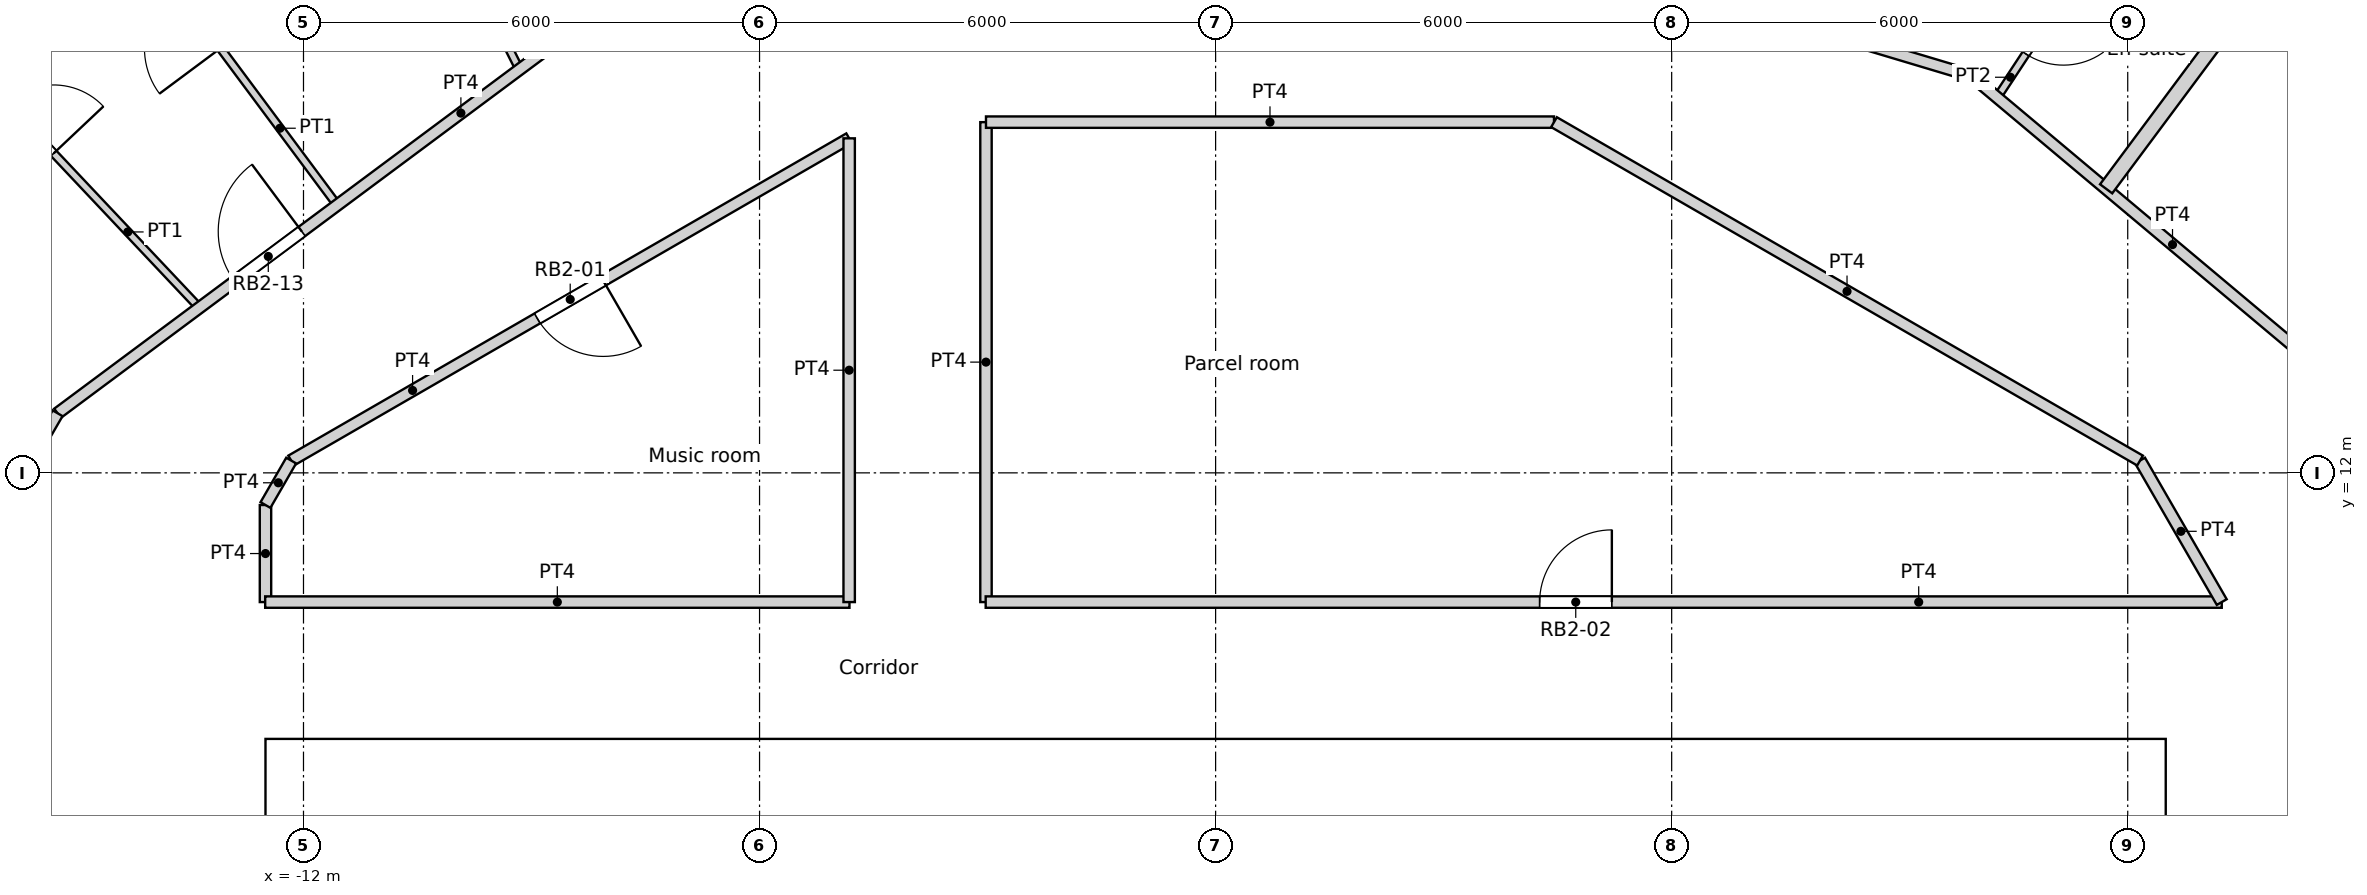
"""IFC4 building model, lengths in metres.
Left out: names, types, materials, properties, quantities, classifications, styles, units other than length and angle.
Written with IfcOpenShell. Run it as: python <this file> out.ifc"""

import sys

from ifc_helpers import new_model, si_unit, direction, frame, frame_2d, origin, origin_2d, place, context, subcontext, project, spatial, rectangle, circle, extrude, element, fill, save


model = new_model("IFC4")
c1 = context("Model", 3, precision=1e-05, world=origin(), true_north=direction((0.0, 1.0)))
c2 = subcontext(c1, "Body", "Model", "MODEL_VIEW")
j1 = project(units=[si_unit("LENGTHUNIT", "METRE"), si_unit("PLANEANGLEUNIT", "RADIAN")], contexts=[c1])
p1 = place(None, origin())
s1 = spatial("IfcSite", under=j1, at=p1, CompositionType="ELEMENT")
p2 = place(p1, origin())
s2 = spatial("IfcBuilding", under=s1, at=p2, CompositionType="ELEMENT")
p3 = place(p2, frame((0.0, 0.0, 136.8)))
s3 = spatial("IfcBuildingStorey", under=s2, at=p3, CompositionType="ELEMENT", Elevation=136.8)
for number, where, z_axis, x_axis in (
    (1, (11.735, 14.716, 0.0), (0.0, 0.0, 1.0), (1.0, 0.0, 0.0)),
    (2, (6.876, 17.521, 0.0), (0.0, 0.0, 1.0), (1.0, 0.0, 0.0)),
    (3, (-9.411, 16.301, 0.0), (0.0, 0.0, 1.0), (1.0, 0.0, 0.0)),
    (4, (-13.798, 12.802, 0.0), (0.0, 0.0, 1.0), (1.0, 0.0, 0.0)),
):
    element("IfcColumn", number, at=place(p3, frame(where, z_axis=z_axis, x_axis=x_axis)), inside=s3, PredefinedType="COLUMN", context=c2, shape_type="SweptSolid", body=[
        extrude(circle(Radius=0.65, at=origin_2d()), origin(), (0.0, 0.0, 1.0), 3.6),
    ])
p4 = place(p3, frame((-12.5, 8.05, 0.0), z_axis=(0.0, 0.0, 1.0), x_axis=(1.0, 0.0, 0.0)))
e5 = element("IfcWall", 5, at=p4, inside=s3, PredefinedType="SOLIDWALL", context=c2, shape_type="SweptSolid", body=[
    extrude(rectangle(XDim=25.0, YDim=0.9, at=frame_2d((12.5, 0.0))), origin(), (0.0, 0.0, 1.0), 3.6),
])
p5 = place(p4, frame((8.3, 0.0, 0.0)))
e6 = element("IfcOpeningElement", 6, at=p5, cuts=e5, PredefinedType="OPENING", context=c2, shape_type="SweptSolid", body=[
    extrude(rectangle(XDim=1.8, YDim=2.1, at=frame_2d((0.9, 1.05))), frame((0.0, 0.45, 0.0), z_axis=(0.0, -1.0, 0.0), x_axis=(1.0, 0.0, 0.0)), (0.0, 0.0, 1.0), 0.9),
])
p6 = place(p3, frame((-12.05, -7.6, 0.0), z_axis=(0.0, 0.0, 1.0), x_axis=(0.0, 1.0, 0.0)))
e7 = element("IfcWall", 7, at=p6, inside=s3, PredefinedType="SOLIDWALL", context=c2, shape_type="SweptSolid", body=[
    extrude(rectangle(XDim=15.2, YDim=0.9, at=frame_2d((7.6, 0.0))), origin(), (0.0, 0.0, 1.0), 3.6),
])
p7 = place(p6, frame((7.1, 0.0, 0.0)))
e8 = element("IfcOpeningElement", 8, at=p7, cuts=e7, PredefinedType="OPENING", context=c2, shape_type="SweptSolid", body=[
    extrude(rectangle(XDim=1.0, YDim=2.1, at=frame_2d((0.5, 1.05))), frame((0.0, 0.45, 0.0), z_axis=(0.0, -1.0, 0.0), x_axis=(1.0, 0.0, 0.0)), (0.0, 0.0, 1.0), 0.9),
])
p8 = place(p3, frame((12.05, -7.6, 0.0), z_axis=(0.0, 0.0, 1.0), x_axis=(0.0, 1.0, 0.0)))
e9 = element("IfcWall", 9, at=p8, inside=s3, PredefinedType="SOLIDWALL", context=c2, shape_type="SweptSolid", body=[
    extrude(rectangle(XDim=15.2, YDim=0.9, at=frame_2d((7.6, 0.0))), origin(), (0.0, 0.0, 1.0), 3.6),
])
p9 = place(p8, frame((5.1, 0.0, 0.0)))
e10 = element("IfcOpeningElement", 10, at=p9, cuts=e9, PredefinedType="OPENING", context=c2, shape_type="SweptSolid", body=[
    extrude(rectangle(XDim=1.0, YDim=2.1, at=frame_2d((0.5, 1.05))), frame((0.0, 0.45, 0.0), z_axis=(0.0, -1.0, 0.0), x_axis=(1.0, 0.0, 0.0)), (0.0, 0.0, 1.0), 0.9),
])
for number, where, z_axis, x_axis in (
    (11, (-2.25, 3.25, 0.0), (0.0, 0.0, 1.0), (0.0, 1.0, 0.0)),
    (12, (0.55, 3.25, 0.0), (0.0, 0.0, 1.0), (0.0, 1.0, 0.0)),
):
    element("IfcWall", number, at=place(p3, frame(where, z_axis=z_axis, x_axis=x_axis)), inside=s3, PredefinedType="SOLIDWALL", context=c2, shape_type="SweptSolid", body=[
        extrude(rectangle(XDim=4.35, YDim=0.3, at=frame_2d((2.175, 0.0))), origin(), (0.0, 0.0, 1.0), 3.3),
    ])
p10 = place(p3, frame((-9.05, -7.0, 0.0), z_axis=(0.0, 0.0, 1.0), x_axis=(0.0, 1.0, 0.0)))
e13 = element("IfcWall", 13, at=p10, inside=s3, PredefinedType="SOLIDWALL", context=c2, shape_type="SweptSolid", body=[
    extrude(rectangle(XDim=14.6, YDim=0.3, at=frame_2d((7.3, 0.0))), origin(), (0.0, 0.0, 1.0), 3.3),
])
p11 = place(p3, frame((-4.275, 6.7, 0.0), z_axis=(0.0, 0.0, 1.0), x_axis=(0.0, 1.0, 0.0)))
e14 = element("IfcWall", 14, at=p11, inside=s3, PredefinedType="SOLIDWALL", context=c2, shape_type="SweptSolid", body=[
    extrude(rectangle(XDim=0.9, YDim=0.15, at=frame_2d((0.45, 0.0))), origin(), (0.0, 0.0, 1.0), 3.3),
])
p12 = place(p3, frame((0.7, 7.15, 0.0), z_axis=(0.0, 0.0, 1.0), x_axis=(1.0, 0.0, 0.0)))
e15 = element("IfcWall", 15, at=p12, inside=s3, PredefinedType="SOLIDWALL", context=c2, shape_type="SweptSolid", body=[
    extrude(rectangle(XDim=8.35, YDim=0.9, at=frame_2d((4.175, 0.0))), origin(), (0.0, 0.0, 1.0), 3.3),
])
p13 = place(p3, frame((-12.504, 10.3, 0.0), z_axis=(0.0, 0.0, 1.0), x_axis=(1.0, 0.0, 0.0)))
e16 = element("IfcWall", 16, at=p13, inside=s3, PredefinedType="PARTITIONING", context=c2, shape_type="SweptSolid", body=[
    extrude(rectangle(XDim=7.687, YDim=0.15, at=frame_2d((3.844, 0.0))), origin(), (0.0, 0.0, 1.0), 3.3),
])
p14 = place(p3, frame((-3.025, 10.3, 0.0), z_axis=(0.0, 0.0, 1.0), x_axis=(1.0, 0.0, 0.0)))
e17 = element("IfcWall", 17, at=p14, inside=s3, PredefinedType="PARTITIONING", context=c2, shape_type="SweptSolid", body=[
    extrude(rectangle(XDim=16.262, YDim=0.15, at=frame_2d((8.131, 0.0))), origin(), (0.0, 0.0, 1.0), 3.3),
])
p15 = place(p14, frame((7.288, 0.0, 0.0)))
e18 = element("IfcOpeningElement", 18, at=p15, cuts=e17, PredefinedType="OPENING", context=c2, shape_type="SweptSolid", body=[
    extrude(rectangle(XDim=0.95, YDim=2.1, at=frame_2d((0.475, 1.05))), frame((0.0, 0.075, 0.0), z_axis=(0.0, -1.0, 0.0), x_axis=(1.0, 0.0, 0.0)), (0.0, 0.0, 1.0), 0.15),
])
p16 = place(p3, frame((12.162, 12.162, 0.0), z_axis=(0.0, 0.0, 1.0), x_axis=(0.499961633463, -0.866047553582, 0.0)))
e19 = element("IfcWall", 19, at=p16, inside=s3, PredefinedType="PARTITIONING", context=c2, shape_type="SweptSolid", body=[
    extrude(rectangle(XDim=2.15, YDim=0.15, at=frame_2d((1.075, 0.0))), origin(), (0.0, 0.0, 1.0), 3.3),
])
p17 = place(p3, frame((9.943, 17.222, 0.0), z_axis=(0.0, 0.0, 1.0), x_axis=(0.766192104565, -0.642611592567, 0.0)))
e20 = element("IfcWall", 20, at=p17, inside=s3, PredefinedType="PARTITIONING", context=c2, shape_type="SweptSolid", body=[
    extrude(rectangle(XDim=6.906, YDim=0.15, at=frame_2d((3.453, 0.0))), origin(), (0.0, 0.0, 1.0), 3.3),
])
p18 = place(p3, frame((-4.821, 10.3, 0.0), z_axis=(0.0, 0.0, 1.0), x_axis=(0.0, 1.0, 0.0)))
e21 = element("IfcWall", 21, at=p18, inside=s3, PredefinedType="PARTITIONING", context=c2, shape_type="SweptSolid", body=[
    extrude(rectangle(XDim=6.101, YDim=0.15, at=frame_2d((3.05, 0.0))), origin(), (0.0, 0.0, 1.0), 3.3),
])
p19 = place(p3, frame((-12.162, 12.162, 0.0), z_axis=(0.0, 0.0, 1.0), x_axis=(0.866004766557, 0.500035743023, 0.0)))
e22 = element("IfcWall", 22, at=p19, inside=s3, PredefinedType="PARTITIONING", context=c2, shape_type="SweptSolid", body=[
    extrude(rectangle(XDim=8.477, YDim=0.15, at=frame_2d((4.239, 0.0))), origin(), (0.0, 0.0, 1.0), 3.3),
])
p20 = place(p19, frame((3.739, 0.0, 0.0)))
e23 = element("IfcOpeningElement", 23, at=p20, cuts=e22, PredefinedType="OPENING", context=c2, shape_type="SweptSolid", body=[
    extrude(rectangle(XDim=1.0, YDim=2.04, at=frame_2d((0.5, 1.02))), frame((0.0, 0.075, 0.0), z_axis=(0.0, -1.0, 0.0), x_axis=(1.0, 0.0, 0.0)), (0.0, 0.0, 1.0), 0.15),
])
p21 = place(p3, frame((4.452, 16.614, 0.0), z_axis=(0.0, 0.0, 1.0), x_axis=(0.866005203721, -0.500034985904, 0.0)))
e24 = element("IfcWall", 24, at=p21, inside=s3, PredefinedType="PARTITIONING", context=c2, shape_type="SweptSolid", body=[
    extrude(rectangle(XDim=8.903, YDim=0.15, at=frame_2d((4.452, 0.0))), origin(), (0.0, 0.0, 1.0), 3.3),
])
p22 = place(p3, frame((-3.021, 16.614, 0.0), z_axis=(0.0, 0.0, 1.0), x_axis=(1.0, 0.0, 0.0)))
e25 = element("IfcWall", 25, at=p22, inside=s3, PredefinedType="PARTITIONING", context=c2, shape_type="SweptSolid", body=[
    extrude(rectangle(XDim=7.473, YDim=0.15, at=frame_2d((3.736, 0.0))), origin(), (0.0, 0.0, 1.0), 3.3),
])
p23 = place(p3, frame((-3.021, 10.3, 0.0), z_axis=(0.0, 0.0, 1.0), x_axis=(0.0, 1.0, 0.0)))
e26 = element("IfcWall", 26, at=p23, inside=s3, PredefinedType="PARTITIONING", context=c2, shape_type="SweptSolid", body=[
    extrude(rectangle(XDim=6.314, YDim=0.15, at=frame_2d((3.157, 0.0))), origin(), (0.0, 0.0, 1.0), 3.3),
])
p24 = place(p3, frame((1.156, 19.853, 0.0), z_axis=(0.0, 0.0, 1.0), x_axis=(0.958024563008, -0.286686129197, 0.0)))
e27 = element("IfcWall", 27, at=p24, inside=s3, PredefinedType="PARTITIONING", context=c2, shape_type="SweptSolid", body=[
    extrude(rectangle(XDim=9.173, YDim=0.15, at=frame_2d((4.587, 0.0))), origin(), (0.0, 0.0, 1.0), 3.3),
])
p25 = place(p24, frame((3.26, 0.0, 0.0)))
e28 = element("IfcOpeningElement", 28, at=p25, cuts=e27, PredefinedType="OPENING", context=c2, shape_type="SweptSolid", body=[
    extrude(rectangle(XDim=1.1, YDim=2.1, at=frame_2d((0.55, 1.05))), frame((0.0, 0.075, 0.0), z_axis=(0.0, -1.0, 0.0), x_axis=(1.0, 0.0, 0.0)), (0.0, 0.0, 1.0), 0.15),
])
p26 = place(p3, frame((-15.235, 12.784, 0.0), z_axis=(0.0, 0.0, 1.0), x_axis=(0.802226995744, 0.597019134785, 0.0)))
e29 = element("IfcWall", 29, at=p26, inside=s3, PredefinedType="PARTITIONING", context=c2, shape_type="SweptSolid", body=[
    extrude(rectangle(XDim=9.173, YDim=0.15, at=frame_2d((4.586, 0.0))), origin(), (0.0, 0.0, 1.0), 3.3),
])
p27 = place(p26, frame((2.906, 0.0, 0.0)))
e30 = element("IfcOpeningElement", 30, at=p27, cuts=e29, PredefinedType="OPENING", context=c2, shape_type="SweptSolid", body=[
    extrude(rectangle(XDim=1.1, YDim=2.1, at=frame_2d((0.55, 1.05))), frame((0.0, 0.075, 0.0), z_axis=(0.0, -1.0, 0.0), x_axis=(1.0, 0.0, 0.0)), (0.0, 0.0, 1.0), 0.15),
])
p28 = place(p3, frame((-12.5, 11.577, 0.0), z_axis=(0.0, 0.0, 1.0), x_axis=(0.500024767483, 0.866011103799, 0.0)))
e31 = element("IfcWall", 31, at=p28, inside=s3, PredefinedType="PARTITIONING", context=c2, shape_type="SweptSolid", body=[
    extrude(rectangle(XDim=0.676, YDim=0.15, at=frame_2d((0.338, 0.0))), origin(), (0.0, 0.0, 1.0), 3.3),
])
p29 = place(p3, frame((-12.5, 10.3, 0.0), z_axis=(0.0, 0.0, 1.0), x_axis=(0.0, 1.0, 0.0)))
e32 = element("IfcWall", 32, at=p29, inside=s3, PredefinedType="PARTITIONING", context=c2, shape_type="SweptSolid", body=[
    extrude(rectangle(XDim=1.277, YDim=0.15, at=frame_2d((0.638, 0.0))), origin(), (0.0, 0.0, 1.0), 3.3),
])
p30 = place(p3, frame((-18.69, 6.803, 0.0), z_axis=(0.0, 0.0, 1.0), x_axis=(0.500229307554, 0.865892972523, 0.0)))
e33 = element("IfcWall", 33, at=p30, inside=s3, PredefinedType="PARTITIONING", context=c2, shape_type="SweptSolid", body=[
    extrude(rectangle(XDim=6.907, YDim=0.15, at=frame_2d((3.454, 0.0))), origin(), (0.0, 0.0, 1.0), 3.3),
])
p31 = place(p30, frame((3.04, 0.0, 0.0)))
e34 = element("IfcOpeningElement", 34, at=p31, cuts=e33, PredefinedType="OPENING", context=c2, shape_type="SweptSolid", body=[
    extrude(rectangle(XDim=1.0, YDim=2.1, at=frame_2d((0.5, 1.05))), frame((0.0, 0.075, 0.0), z_axis=(0.0, -1.0, 0.0), x_axis=(1.0, 0.0, 0.0)), (0.0, 0.0, 1.0), 0.15),
])
p32 = place(p3, frame((11.716, 15.737, 0.0), z_axis=(0.0, 0.0, 1.0), x_axis=(0.597131981171, 0.802143002876, 0.0)))
e35 = element("IfcWall", 35, at=p32, inside=s3, PredefinedType="PARTITIONING", context=c2, shape_type="SweptSolid", body=[
    extrude(rectangle(XDim=5.878, YDim=0.2, at=frame_2d((2.939, 0.0))), origin(), (0.0, 0.0, 1.0), 3.3),
])
p33 = place(p3, frame((10.282, 16.939, 0.0), z_axis=(0.0, 0.0, 1.0), x_axis=(0.549730960803, 0.83534176882, 0.0)))
e36 = element("IfcWall", 36, at=p33, inside=s3, PredefinedType="PARTITIONING", context=c2, shape_type="SweptSolid", body=[
    extrude(rectangle(XDim=2.272, YDim=0.1, at=frame_2d((1.136, 0.0))), origin(), (0.0, 0.0, 1.0), 3.3),
])
p34 = place(p33, frame((0.686, 0.0, 0.0)))
e37 = element("IfcOpeningElement", 37, at=p34, cuts=e36, PredefinedType="OPENING", context=c2, shape_type="SweptSolid", body=[
    extrude(rectangle(XDim=0.9, YDim=2.04, at=frame_2d((0.45, 1.02))), frame((0.0, 0.05, 0.0), z_axis=(0.0, -1.0, 0.0), x_axis=(1.0, 0.0, 0.0)), (0.0, 0.0, 1.0), 0.1),
])
p35 = place(p3, frame((-15.226, 20.452, 0.0), z_axis=(0.0, 0.0, 1.0), x_axis=(0.597155230642, -0.802125694961, 0.0)))
e38 = element("IfcWall", 38, at=p35, inside=s3, PredefinedType="PARTITIONING", context=c2, shape_type="SweptSolid", body=[
    extrude(rectangle(XDim=6.146, YDim=0.1, at=frame_2d((3.073, 0.0))), origin(), (0.0, 0.0, 1.0), 3.3),
])
p36 = place(p35, frame((2.573, 0.0, 0.0)))
e39 = element("IfcOpeningElement", 39, at=p36, cuts=e38, PredefinedType="OPENING", context=c2, shape_type="SweptSolid", body=[
    extrude(rectangle(XDim=1.0, YDim=2.04, at=frame_2d((0.5, 1.02))), frame((0.0, 0.05, 0.0), z_axis=(0.0, -1.0, 0.0), x_axis=(1.0, 0.0, 0.0)), (0.0, 0.0, 1.0), 0.1),
])
p37 = place(p3, frame((-10.222, 19.423, 0.0), z_axis=(0.0, 0.0, 1.0), x_axis=(0.448862306063, -0.893600934532, 0.0)))
e40 = element("IfcWall", 40, at=p37, inside=s3, PredefinedType="PARTITIONING", context=c2, shape_type="SweptSolid", body=[
    extrude(rectangle(XDim=2.368, YDim=0.1, at=frame_2d((1.184, 0.0))), origin(), (0.0, 0.0, 1.0), 3.3),
])
p38 = place(p37, frame((0.734, 0.0, 0.0)))
e41 = element("IfcOpeningElement", 41, at=p38, cuts=e40, PredefinedType="OPENING", context=c2, shape_type="SweptSolid", body=[
    extrude(rectangle(XDim=0.9, YDim=2.0, at=frame_2d((0.45, 1.0))), frame((0.0, 0.05, 0.0), z_axis=(0.0, -1.0, 0.0), x_axis=(1.0, 0.0, 0.0)), (0.0, 0.0, 1.0), 0.1),
])
p39 = place(p3, frame((-17.497, 18.546, 0.0), z_axis=(0.0, 0.0, 1.0), x_axis=(0.68628608304, -0.72733170715, 0.0)))
e42 = element("IfcWall", 42, at=p39, inside=s3, PredefinedType="PARTITIONING", context=c2, shape_type="SweptSolid", body=[
    extrude(rectangle(XDim=6.013, YDim=0.1, at=frame_2d((3.007, 0.0))), origin(), (0.0, 0.0, 1.0), 3.3),
])
p40 = place(p39, frame((2.321, 0.0, 0.0)))
e43 = element("IfcOpeningElement", 43, at=p40, cuts=e42, PredefinedType="OPENING", context=c2, shape_type="SweptSolid", body=[
    extrude(rectangle(XDim=0.9, YDim=2.1, at=frame_2d((0.45, 1.05))), frame((0.0, 0.05, 0.0), z_axis=(0.0, -1.0, 0.0), x_axis=(1.0, 0.0, 0.0)), (0.0, 0.0, 1.0), 0.1),
])
p41 = place(p5, origin())
e44 = element("IfcDoor", 44, at=p41, inside=s3, OperationType="DOUBLE_DOOR_SINGLE_SWING", PredefinedType="DOOR", context=c2, shape_type="SweptSolid", body=[
    extrude(rectangle(XDim=1.8, YDim=2.1, at=frame_2d((0.9, 1.05))), frame((0.0, 0.025, 0.0), z_axis=(0.0, -1.0, 0.0), x_axis=(1.0, 0.0, 0.0)), (0.0, 0.0, 1.0), 0.05),
])
fill(e6, e44)
p42 = place(p20, origin())
e45 = element("IfcDoor", 45, at=p42, inside=s3, OperationType="SINGLE_SWING_LEFT", PredefinedType="DOOR", context=c2, shape_type="SweptSolid", body=[
    extrude(rectangle(XDim=1.0, YDim=2.04, at=frame_2d((0.5, 1.02))), frame((0.0, 0.025, 0.0), z_axis=(0.0, -1.0, 0.0), x_axis=(1.0, 0.0, 0.0)), (0.0, 0.0, 1.0), 0.05),
])
fill(e23, e45)
p43 = place(p15, origin())
e46 = element("IfcDoor", 46, at=p43, inside=s3, OperationType="SINGLE_SWING_RIGHT", PredefinedType="DOOR", context=c2, shape_type="SweptSolid", body=[
    extrude(rectangle(XDim=0.95, YDim=2.1, at=frame_2d((0.475, 1.05))), frame((0.0, 0.025, 0.0), z_axis=(0.0, -1.0, 0.0), x_axis=(1.0, 0.0, 0.0)), (0.0, 0.0, 1.0), 0.05),
])
fill(e18, e46)
p44 = place(p34, origin())
e47 = element("IfcDoor", 47, at=p44, inside=s3, OperationType="SINGLE_SWING_LEFT", PredefinedType="DOOR", context=c2, shape_type="SweptSolid", body=[
    extrude(rectangle(XDim=0.9, YDim=2.04, at=frame_2d((0.45, 1.02))), frame((0.0, 0.025, 0.0), z_axis=(0.0, -1.0, 0.0), x_axis=(1.0, 0.0, 0.0)), (0.0, 0.0, 1.0), 0.05),
])
fill(e37, e47)
p45 = place(p27, origin())
e48 = element("IfcDoor", 48, at=p45, inside=s3, OperationType="SINGLE_SWING_RIGHT", PredefinedType="DOOR", context=c2, shape_type="SweptSolid", body=[
    extrude(rectangle(XDim=1.1, YDim=2.1, at=frame_2d((0.55, 1.05))), frame((0.0, 0.025, 0.0), z_axis=(0.0, -1.0, 0.0), x_axis=(1.0, 0.0, 0.0)), (0.0, 0.0, 1.0), 0.05),
])
fill(e30, e48)
p46 = place(p40, origin())
e49 = element("IfcDoor", 49, at=p46, inside=s3, OperationType="SINGLE_SWING_RIGHT", PredefinedType="DOOR", context=c2, shape_type="SweptSolid", body=[
    extrude(rectangle(XDim=0.9, YDim=2.1, at=frame_2d((0.45, 1.05))), frame((0.0, 0.025, 0.0), z_axis=(0.0, -1.0, 0.0), x_axis=(1.0, 0.0, 0.0)), (0.0, 0.0, 1.0), 0.05),
])
fill(e43, e49)
save(model, sys.argv[1])
